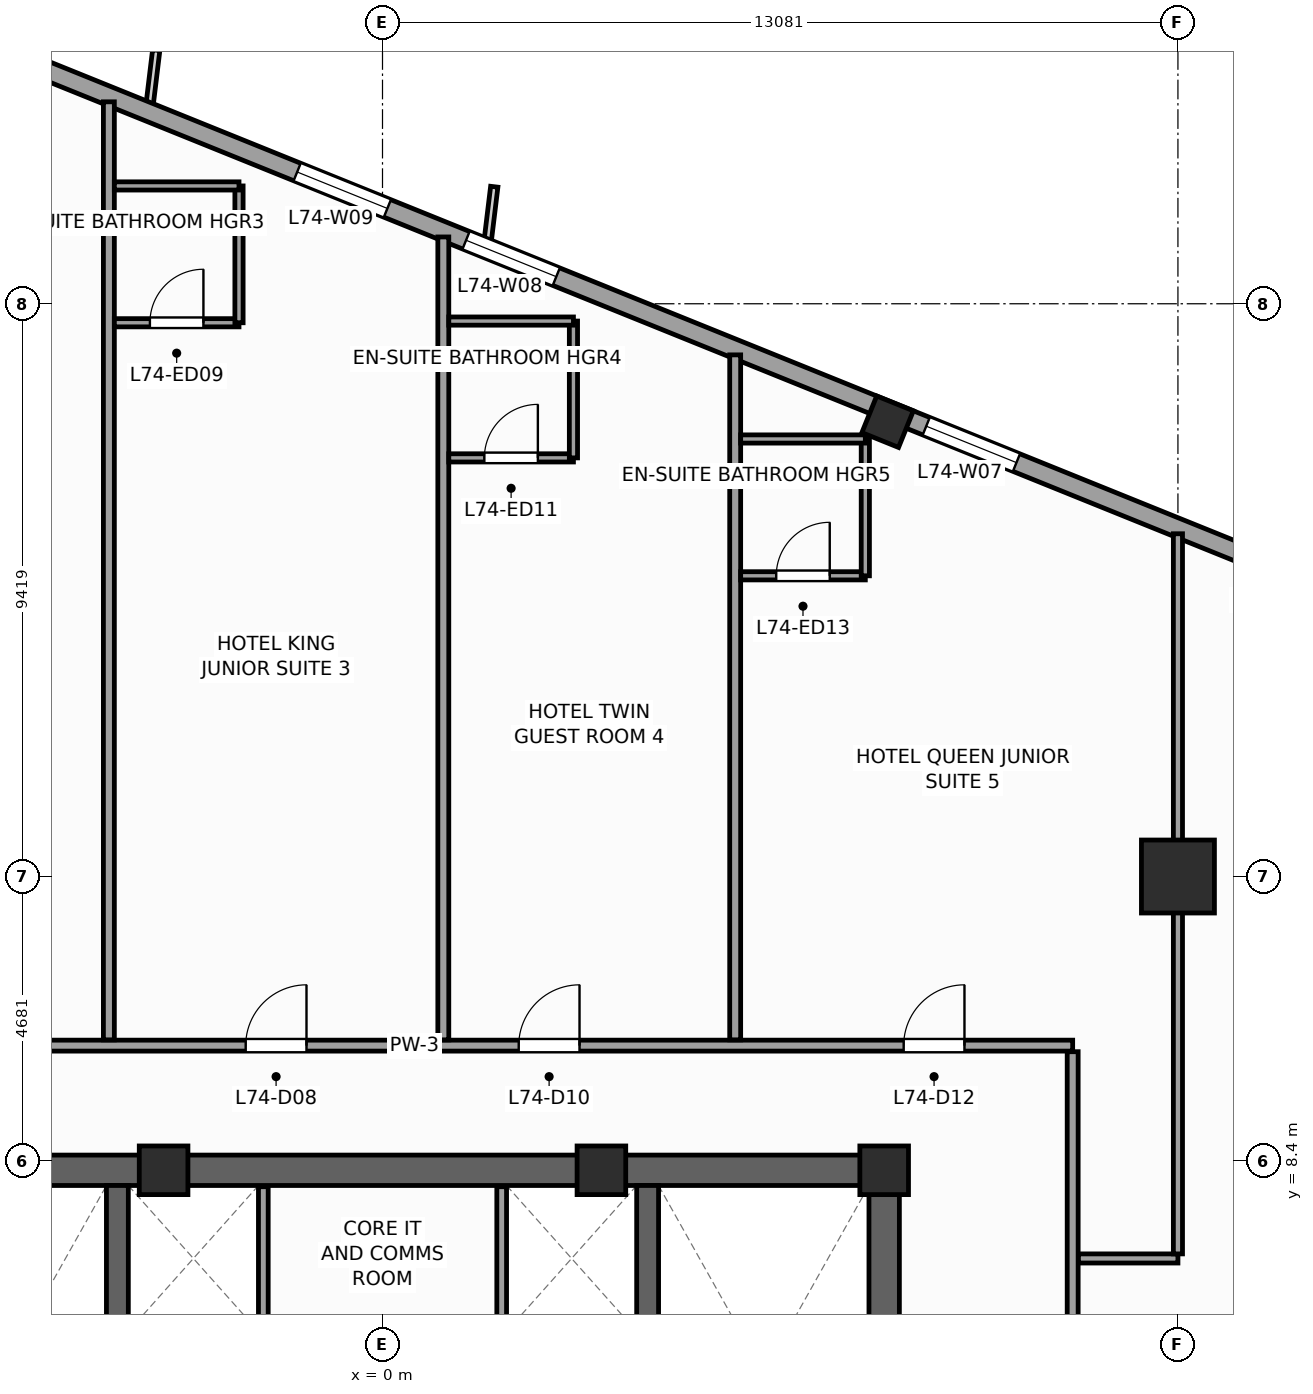
"""IFC4 building model, lengths in metres.
Left out: names, types, materials, properties, quantities, classifications, styles, units other than length and angle.
Written with IfcOpenShell. Run it as: python <this file> out.ifc"""

import sys

from ifc_helpers import new_model, si_unit, direction, frame, frame_2d, origin, origin_2d, place, context, subcontext, project, spatial, rectangle, extrude, source, transform, mapped, element, fill, save


model = new_model("IFC4")
c1 = context("Model", 3, precision=1e-05, world=origin(), true_north=direction((0.0, 1.0)))
c2 = subcontext(c1, "Body", "Model", "MODEL_VIEW")
j1 = project(units=[si_unit("LENGTHUNIT", "METRE"), si_unit("PLANEANGLEUNIT", "RADIAN")], contexts=[c1])
p1 = place(None, origin())
s1 = spatial("IfcSite", under=j1, at=p1, CompositionType="ELEMENT")
p2 = place(p1, origin())
s2 = spatial("IfcBuilding", under=s1, at=p2, CompositionType="ELEMENT")
p3 = place(p2, frame((0.0, 0.0, 301.2)))
s3 = spatial("IfcBuildingStorey", under=s2, at=p3, CompositionType="ELEMENT", Elevation=301.2)
p4 = place(p3, frame((-8.5, 8.25, 0.0), z_axis=(0.0, 0.0, 1.0), x_axis=(1.0, 0.0, 0.0)))
e1 = element("IfcWall", 1, at=p4, inside=s3, PredefinedType="SHEAR", context=c2, shape_type="SweptSolid", body=[
    extrude(rectangle(XDim=17.0, YDim=0.5, at=frame_2d((8.5, 0.0))), origin(), (0.0, 0.0, 1.0), 3.6),
])
p5 = place(p3, frame((8.25, -8.0, 0.0), z_axis=(0.0, 0.0, 1.0), x_axis=(0.0, 1.0, 0.0)))
e2 = element("IfcWall", 2, at=p5, inside=s3, PredefinedType="SHEAR", context=c2, shape_type="SweptSolid", body=[
    extrude(rectangle(XDim=16.0, YDim=0.5, at=frame_2d((8.0, 0.0))), origin(), (0.0, 0.0, 1.0), 3.6),
])
p6 = place(p5, frame((4.69, 0.0, 0.0)))
e3 = element("IfcOpeningElement", 3, at=p6, cuts=e2, PredefinedType="OPENING", context=c2, shape_type="SweptSolid", body=[
    extrude(rectangle(XDim=1.3, YDim=2.2, at=frame_2d((0.65, 1.1))), frame((0.0, 0.26, 0.0), z_axis=(0.0, -1.0, 0.0), x_axis=(1.0, 0.0, 0.0)), (0.0, 0.0, 1.0), 0.52),
])
for number, where, z_axis, x_axis in (
    (4, (-4.36, -8.0, 0.0), (0.0, 0.0, 1.0), (0.0, 1.0, 0.0)),
    (5, (4.36, -8.0, 0.0), (0.0, 0.0, 1.0), (0.0, 1.0, 0.0)),
):
    element("IfcWall", number, at=place(p3, frame(where, z_axis=z_axis, x_axis=x_axis)), inside=s3, PredefinedType="SHEAR", context=c2, shape_type="SweptSolid", body=[
        extrude(rectangle(XDim=16.0, YDim=0.36, at=frame_2d((8.0, 0.0))), origin(), (0.0, 0.0, 1.0), 3.6),
    ])
m1 = source(origin(), c2, "Body", "SweptSolid", [
    extrude(rectangle(XDim=0.8, YDim=0.8, at=origin_2d()), origin(), (0.0, 0.0, 1.0), 3.6),
])
for number, where, z_axis, x_axis in (
    (6, (8.25, 8.25, 0.0), (0.0, 0.0, 1.0), (1.0, 0.0, 0.0)),
    (7, (-3.6, 8.25, 0.0), (0.0, 0.0, 1.0), (1.0, 0.0, 0.0)),
    (8, (3.6, 8.25, 0.0), (0.0, 0.0, 1.0), (1.0, 0.0, 0.0)),
):
    element("IfcColumn", number, at=place(p3, frame(where, z_axis=z_axis, x_axis=x_axis)), inside=s3, PredefinedType="PILASTER", context=c2, shape_type="MappedRepresentation", body=[
        mapped(m1, transform((0.0, 0.0, 0.0), scale=1.0)),
    ])
m2 = source(origin(), c2, "Body", "SweptSolid", [
    extrude(rectangle(XDim=1.2, YDim=1.2, at=origin_2d()), origin(), (0.0, 0.0, 1.0), 3.6),
])
p7 = place(p3, frame((13.081, 13.081, 0.0), z_axis=(0.0, 0.0, 1.0), x_axis=(1.0, 0.0, 0.0)))
e9 = element("IfcColumn", 9, at=p7, inside=s3, PredefinedType="COLUMN", context=c2, shape_type="MappedRepresentation", body=[
    mapped(m2, transform((0.0, 0.0, 0.0), scale=1.0)),
])
m3 = source(origin(), c2, "Body", "SweptSolid", [
    extrude(rectangle(XDim=0.65, YDim=0.65, at=origin_2d()), origin(), (0.0, 0.0, 1.0), 3.6),
])
p8 = place(p3, frame((8.307, 20.56, 0.0), z_axis=(0.0, 0.0, 1.0), x_axis=(0.374606593416, 0.927183854567, 0.0)))
e10 = element("IfcColumn", 10, at=p8, inside=s3, PredefinedType="COLUMN", context=c2, shape_type="MappedRepresentation", body=[
    mapped(m3, transform((0.0, 0.0, 0.0), scale=1.0)),
])
p9 = place(p3, frame((23.813, 14.479, 0.0), z_axis=(0.0, 0.0, 1.0), x_axis=(-0.927182657188, 0.374609557019, 0.0)))
e11 = element("IfcWall", 11, at=p9, inside=s3, PredefinedType="STANDARD", context=c2, shape_type="SweptSolid", body=[
    extrude(rectangle(XDim=33.31, YDim=0.31, at=frame_2d((16.655, 0.0))), origin(), (0.0, 0.0, 1.0), 2.75),
])
p10 = place(p9, frame((3.197, 0.0, 0.47)))
e12 = element("IfcOpeningElement", 12, at=p10, cuts=e11, PredefinedType="OPENING", context=c2, shape_type="SweptSolid", body=[
    extrude(rectangle(XDim=1.6, YDim=2.1, at=frame_2d((0.8, 1.05))), frame((0.0, 0.165, 0.0), z_axis=(0.0, -1.0, 0.0), x_axis=(1.0, 0.0, 0.0)), (0.0, 0.0, 1.0), 0.33),
])
p11 = place(p9, frame((8.86, 0.0, 0.47)))
e13 = element("IfcOpeningElement", 13, at=p11, cuts=e11, PredefinedType="OPENING", context=c2, shape_type="SweptSolid", body=[
    extrude(rectangle(XDim=1.6, YDim=2.1, at=frame_2d((0.8, 1.05))), frame((0.0, 0.165, 0.0), z_axis=(0.0, -1.0, 0.0), x_axis=(1.0, 0.0, 0.0)), (0.0, 0.0, 1.0), 0.33),
])
p12 = place(p9, frame((14.439, 0.0, 0.47)))
e14 = element("IfcOpeningElement", 14, at=p12, cuts=e11, PredefinedType="OPENING", context=c2, shape_type="SweptSolid", body=[
    extrude(rectangle(XDim=1.6, YDim=2.1, at=frame_2d((0.8, 1.05))), frame((0.0, 0.165, 0.0), z_axis=(0.0, -1.0, 0.0), x_axis=(1.0, 0.0, 0.0)), (0.0, 0.0, 1.0), 0.33),
])
p13 = place(p9, frame((22.601, 0.0, 0.47)))
e15 = element("IfcOpeningElement", 15, at=p13, cuts=e11, PredefinedType="OPENING", context=c2, shape_type="SweptSolid", body=[
    extrude(rectangle(XDim=1.6, YDim=2.1, at=frame_2d((0.8, 1.05))), frame((0.0, 0.165, 0.0), z_axis=(0.0, -1.0, 0.0), x_axis=(1.0, 0.0, 0.0)), (0.0, 0.0, 1.0), 0.33),
])
p14 = place(p9, frame((25.597, 0.0, 0.47)))
e16 = element("IfcOpeningElement", 16, at=p14, cuts=e11, PredefinedType="OPENING", context=c2, shape_type="SweptSolid", body=[
    extrude(rectangle(XDim=1.6, YDim=2.1, at=frame_2d((0.8, 1.05))), frame((0.0, 0.165, 0.0), z_axis=(0.0, -1.0, 0.0), x_axis=(1.0, 0.0, 0.0)), (0.0, 0.0, 1.0), 0.33),
])
for number, where, z_axis, x_axis in (
    (17, (-1.96, 4.58, 0.0), (0.0, 0.0, 1.0), (0.0, 1.0, 0.0)),
    (18, (1.96, 4.58, 0.0), (0.0, 0.0, 1.0), (0.0, 1.0, 0.0)),
):
    element("IfcWall", number, at=place(p3, frame(where, z_axis=z_axis, x_axis=x_axis)), inside=s3, PredefinedType="PARTITIONING", context=c2, shape_type="SweptSolid", body=[
        extrude(rectangle(XDim=3.4, YDim=0.16, at=frame_2d((1.7, 0.0))), origin(), (0.0, 0.0, 1.0), 3.35),
    ])
p15 = place(p3, frame((-10.3, 10.3, 0.0), z_axis=(0.0, 0.0, 1.0), x_axis=(1.0, 0.0, 0.0)))
e19 = element("IfcWall", 19, at=p15, inside=s3, PredefinedType="PARTITIONING", context=c2, shape_type="SweptSolid", body=[
    extrude(rectangle(XDim=21.65, YDim=0.18, at=frame_2d((10.825, 0.0))), origin(), (0.0, 0.0, 1.0), 3.35),
])
p16 = place(p15, frame((2.564, 0.0, 0.0)))
e20 = element("IfcOpeningElement", 20, at=p16, cuts=e19, PredefinedType="OPENING", context=c2, shape_type="SweptSolid", body=[
    extrude(rectangle(XDim=1.0, YDim=2.15, at=frame_2d((0.5, 1.075))), frame((0.0, 0.1, 0.0), z_axis=(0.0, -1.0, 0.0), x_axis=(1.0, 0.0, 0.0)), (0.0, 0.0, 1.0), 0.2),
])
p17 = place(p15, frame((8.05, 0.0, 0.0)))
e21 = element("IfcOpeningElement", 21, at=p17, cuts=e19, PredefinedType="OPENING", context=c2, shape_type="SweptSolid", body=[
    extrude(rectangle(XDim=1.0, YDim=2.15, at=frame_2d((0.5, 1.075))), frame((0.0, 0.1, 0.0), z_axis=(0.0, -1.0, 0.0), x_axis=(1.0, 0.0, 0.0)), (0.0, 0.0, 1.0), 0.2),
])
p18 = place(p15, frame((12.54, 0.0, 0.0)))
e22 = element("IfcOpeningElement", 22, at=p18, cuts=e19, PredefinedType="OPENING", context=c2, shape_type="SweptSolid", body=[
    extrude(rectangle(XDim=1.0, YDim=2.15, at=frame_2d((0.5, 1.075))), frame((0.0, 0.1, 0.0), z_axis=(0.0, -1.0, 0.0), x_axis=(1.0, 0.0, 0.0)), (0.0, 0.0, 1.0), 0.2),
])
p19 = place(p15, frame((18.871, 0.0, 0.0)))
e23 = element("IfcOpeningElement", 23, at=p19, cuts=e19, PredefinedType="OPENING", context=c2, shape_type="SweptSolid", body=[
    extrude(rectangle(XDim=1.0, YDim=2.15, at=frame_2d((0.5, 1.075))), frame((0.0, 0.1, 0.0), z_axis=(0.0, -1.0, 0.0), x_axis=(1.0, 0.0, 0.0)), (0.0, 0.0, 1.0), 0.2),
])
p20 = place(p3, frame((11.35, -12.35, 0.0), z_axis=(0.0, 0.0, 1.0), x_axis=(0.0, 1.0, 0.0)))
e24 = element("IfcWall", 24, at=p20, inside=s3, PredefinedType="PARTITIONING", context=c2, shape_type="SweptSolid", body=[
    extrude(rectangle(XDim=22.55, YDim=0.18, at=frame_2d((11.275, 0.0))), origin(), (0.0, 0.0, 1.0), 3.35),
])
p21 = place(p20, frame((17.15, 0.0, 0.0)))
e25 = element("IfcOpeningElement", 25, at=p21, cuts=e24, PredefinedType="OPENING", context=c2, shape_type="SweptSolid", body=[
    extrude(rectangle(XDim=1.0, YDim=2.15, at=frame_2d((0.5, 1.075))), frame((0.0, 0.1, 0.0), z_axis=(0.0, -1.0, 0.0), x_axis=(1.0, 0.0, 0.0)), (0.0, 0.0, 1.0), 0.2),
])
p22 = place(p20, frame((13.5, 0.0, 0.0)))
e26 = element("IfcOpeningElement", 26, at=p22, cuts=e24, PredefinedType="OPENING", context=c2, shape_type="SweptSolid", body=[
    extrude(rectangle(XDim=1.0, YDim=2.15, at=frame_2d((0.5, 1.075))), frame((0.0, 0.1, 0.0), z_axis=(0.0, -1.0, 0.0), x_axis=(1.0, 0.0, 0.0)), (0.0, 0.0, 1.0), 0.2),
])
p23 = place(p20, frame((9.5, 0.0, 0.0)))
e27 = element("IfcOpeningElement", 27, at=p23, cuts=e24, PredefinedType="OPENING", context=c2, shape_type="SweptSolid", body=[
    extrude(rectangle(XDim=1.0, YDim=2.15, at=frame_2d((0.5, 1.075))), frame((0.0, 0.1, 0.0), z_axis=(0.0, -1.0, 0.0), x_axis=(1.0, 0.0, 0.0)), (0.0, 0.0, 1.0), 0.2),
])
p24 = place(p20, frame((6.35, 0.0, 0.0)))
e28 = element("IfcOpeningElement", 28, at=p24, cuts=e24, PredefinedType="OPENING", context=c2, shape_type="SweptSolid", body=[
    extrude(rectangle(XDim=1.0, YDim=2.15, at=frame_2d((0.5, 1.075))), frame((0.0, 0.1, 0.0), z_axis=(0.0, -1.0, 0.0), x_axis=(1.0, 0.0, 0.0)), (0.0, 0.0, 1.0), 0.2),
])
p25 = place(p20, frame((2.439, 0.0, 0.0)))
e29 = element("IfcOpeningElement", 29, at=p25, cuts=e24, PredefinedType="OPENING", context=c2, shape_type="SweptSolid", body=[
    extrude(rectangle(XDim=1.0, YDim=2.15, at=frame_2d((0.5, 1.075))), frame((0.0, 0.1, 0.0), z_axis=(0.0, -1.0, 0.0), x_axis=(1.0, 0.0, 0.0)), (0.0, 0.0, 1.0), 0.2),
])
p26 = place(p3, frame((-4.5, 10.395, 0.0), z_axis=(0.0, 0.0, 1.0), x_axis=(0.0, 1.0, 0.0)))
e30 = element("IfcWall", 30, at=p26, inside=s3, PredefinedType="PARTITIONING", context=c2, shape_type="SweptSolid", body=[
    extrude(rectangle(XDim=15.426, YDim=0.18, at=frame_2d((7.713, 0.0))), origin(), (0.0, 0.0, 1.0), 3.35),
])
p27 = place(p3, frame((1.0, 10.395, 0.0), z_axis=(0.0, 0.0, 1.0), x_axis=(0.0, 1.0, 0.0)))
e31 = element("IfcWall", 31, at=p27, inside=s3, PredefinedType="PARTITIONING", context=c2, shape_type="SweptSolid", body=[
    extrude(rectangle(XDim=13.204, YDim=0.18, at=frame_2d((6.602, 0.0))), origin(), (0.0, 0.0, 1.0), 3.35),
])
p28 = place(p3, frame((5.8, 10.395, 0.0), z_axis=(0.0, 0.0, 1.0), x_axis=(0.0, 1.0, 0.0)))
e32 = element("IfcWall", 32, at=p28, inside=s3, PredefinedType="PARTITIONING", context=c2, shape_type="SweptSolid", body=[
    extrude(rectangle(XDim=11.264, YDim=0.18, at=frame_2d((5.632, 0.0))), origin(), (0.0, 0.0, 1.0), 3.35),
])
p29 = place(p3, frame((11.445, 6.8, 0.0), z_axis=(0.0, 0.0, 1.0), x_axis=(1.0, 0.0, 0.0)))
e33 = element("IfcWall", 33, at=p29, inside=s3, PredefinedType="PARTITIONING", context=c2, shape_type="SweptSolid", body=[
    extrude(rectangle(XDim=1.636, YDim=0.15, at=frame_2d((0.818, 0.0))), origin(), (0.0, 0.0, 1.0), 3.35),
])
p30 = place(p3, frame((13.081, 6.875, 0.0), z_axis=(0.0, 0.0, 1.0), x_axis=(0.0, 1.0, 0.0)))
e34 = element("IfcWall", 34, at=p30, inside=s3, PredefinedType="PARTITIONING", context=c2, shape_type="SweptSolid", body=[
    extrude(rectangle(XDim=11.843, YDim=0.15, at=frame_2d((5.921, 0.0))), origin(), (0.0, 0.0, 1.0), 2.45),
])
p31 = place(p3, frame((-4.41, 22.188, 0.0), z_axis=(0.0, 0.0, 1.0), x_axis=(1.0, 0.0, 0.0)))
e35 = element("IfcWall", 35, at=p31, inside=s3, PredefinedType="PARTITIONING", context=c2, shape_type="SweptSolid", body=[
    extrude(rectangle(XDim=2.05, YDim=0.135, at=frame_2d((1.025, 0.0))), origin(), (0.0, 0.0, 1.0), 3.35),
])
p32 = place(p31, frame((0.585, 0.0, 0.0)))
e36 = element("IfcOpeningElement", 36, at=p32, cuts=e35, PredefinedType="OPENING", context=c2, shape_type="SweptSolid", body=[
    extrude(rectangle(XDim=0.88, YDim=2.1, at=frame_2d((0.44, 1.05))), frame((0.0, 0.078, 0.0), z_axis=(0.0, -1.0, 0.0), x_axis=(1.0, 0.0, 0.0)), (0.0, 0.0, 1.0), 0.155),
])
p33 = place(p3, frame((-2.36, 22.188, 0.0), z_axis=(0.0, 0.0, 1.0), x_axis=(0.0, 1.0, 0.0)))
e37 = element("IfcWall", 37, at=p33, inside=s3, PredefinedType="PARTITIONING", context=c2, shape_type="SweptSolid", body=[
    extrude(rectangle(XDim=2.25, YDim=0.135, at=frame_2d((1.125, 0.0))), origin(), (0.0, 0.0, 1.0), 3.35),
])
p34 = place(p3, frame((-4.41, 24.438, 0.0), z_axis=(0.0, 0.0, 1.0), x_axis=(1.0, 0.0, 0.0)))
e38 = element("IfcWall", 38, at=p34, inside=s3, PredefinedType="PARTITIONING", context=c2, shape_type="SweptSolid", body=[
    extrude(rectangle(XDim=2.05, YDim=0.135, at=frame_2d((1.025, 0.0))), origin(), (0.0, 0.0, 1.0), 3.35),
])
p35 = place(p3, frame((1.09, 19.965, 0.0), z_axis=(0.0, 0.0, 1.0), x_axis=(1.0, 0.0, 0.0)))
e39 = element("IfcWall", 39, at=p35, inside=s3, PredefinedType="PARTITIONING", context=c2, shape_type="SweptSolid", body=[
    extrude(rectangle(XDim=2.05, YDim=0.135, at=frame_2d((1.025, 0.0))), origin(), (0.0, 0.0, 1.0), 3.35),
])
p36 = place(p35, frame((0.585, 0.0, 0.0)))
e40 = element("IfcOpeningElement", 40, at=p36, cuts=e39, PredefinedType="OPENING", context=c2, shape_type="SweptSolid", body=[
    extrude(rectangle(XDim=0.88, YDim=2.1, at=frame_2d((0.44, 1.05))), frame((0.0, 0.078, 0.0), z_axis=(0.0, -1.0, 0.0), x_axis=(1.0, 0.0, 0.0)), (0.0, 0.0, 1.0), 0.155),
])
p37 = place(p3, frame((3.14, 19.965, 0.0), z_axis=(0.0, 0.0, 1.0), x_axis=(0.0, 1.0, 0.0)))
e41 = element("IfcWall", 41, at=p37, inside=s3, PredefinedType="PARTITIONING", context=c2, shape_type="SweptSolid", body=[
    extrude(rectangle(XDim=2.25, YDim=0.135, at=frame_2d((1.125, 0.0))), origin(), (0.0, 0.0, 1.0), 3.35),
])
p38 = place(p3, frame((1.09, 22.215, 0.0), z_axis=(0.0, 0.0, 1.0), x_axis=(1.0, 0.0, 0.0)))
e42 = element("IfcWall", 42, at=p38, inside=s3, PredefinedType="PARTITIONING", context=c2, shape_type="SweptSolid", body=[
    extrude(rectangle(XDim=2.05, YDim=0.135, at=frame_2d((1.025, 0.0))), origin(), (0.0, 0.0, 1.0), 3.35),
])
p39 = place(p3, frame((5.89, 18.026, 0.0), z_axis=(0.0, 0.0, 1.0), x_axis=(1.0, 0.0, 0.0)))
e43 = element("IfcWall", 43, at=p39, inside=s3, PredefinedType="PARTITIONING", context=c2, shape_type="SweptSolid", body=[
    extrude(rectangle(XDim=2.05, YDim=0.135, at=frame_2d((1.025, 0.0))), origin(), (0.0, 0.0, 1.0), 2.95),
])
p40 = place(p39, frame((0.585, 0.0, 0.0)))
e44 = element("IfcOpeningElement", 44, at=p40, cuts=e43, PredefinedType="OPENING", context=c2, shape_type="SweptSolid", body=[
    extrude(rectangle(XDim=0.88, YDim=2.1, at=frame_2d((0.44, 1.05))), frame((0.0, 0.078, 0.0), z_axis=(0.0, -1.0, 0.0), x_axis=(1.0, 0.0, 0.0)), (0.0, 0.0, 1.0), 0.155),
])
p41 = place(p3, frame((7.94, 18.026, 0.0), z_axis=(0.0, 0.0, 1.0), x_axis=(0.0, 1.0, 0.0)))
e45 = element("IfcWall", 45, at=p41, inside=s3, PredefinedType="PARTITIONING", context=c2, shape_type="SweptSolid", body=[
    extrude(rectangle(XDim=2.25, YDim=0.135, at=frame_2d((1.125, 0.0))), origin(), (0.0, 0.0, 1.0), 3.35),
])
p42 = place(p3, frame((5.89, 20.276, 0.0), z_axis=(0.0, 0.0, 1.0), x_axis=(1.0, 0.0, 0.0)))
e46 = element("IfcWall", 46, at=p42, inside=s3, PredefinedType="PARTITIONING", context=c2, shape_type="SweptSolid", body=[
    extrude(rectangle(XDim=2.05, YDim=0.135, at=frame_2d((1.025, 0.0))), origin(), (0.0, 0.0, 1.0), 3.35),
])
m4 = source(origin(), c2, "Body", "SweptSolid", [
    extrude(rectangle(XDim=1.6, YDim=2.1, at=frame_2d((0.8, 1.05))), frame((0.0, 0.03, 0.0), z_axis=(0.0, -1.0, 0.0), x_axis=(1.0, 0.0, 0.0)), (0.0, 0.0, 1.0), 0.06),
])
p43 = place(p12, origin())
e47 = element("IfcWindow", 47, at=p43, inside=s3, PartitioningType="SINGLE_PANEL", PredefinedType="WINDOW", context=c2, shape_type="MappedRepresentation", body=[
    mapped(m4, transform((0.0, 0.0, 0.0), scale=1.0)),
])
fill(e14, e47)
p44 = place(p13, origin())
e48 = element("IfcWindow", 48, at=p44, inside=s3, PartitioningType="SINGLE_PANEL", PredefinedType="WINDOW", context=c2, shape_type="MappedRepresentation", body=[
    mapped(m4, transform((0.0, 0.0, 0.0), scale=1.0)),
])
fill(e15, e48)
p45 = place(p14, origin())
e49 = element("IfcWindow", 49, at=p45, inside=s3, PartitioningType="SINGLE_PANEL", PredefinedType="WINDOW", context=c2, shape_type="MappedRepresentation", body=[
    mapped(m4, transform((0.0, 0.0, 0.0), scale=1.0)),
])
fill(e16, e49)
m5 = source(origin(), c2, "Body", "SweptSolid", [
    extrude(rectangle(XDim=1.0, YDim=2.15, at=frame_2d((0.5, 1.075))), frame((0.0, 0.025, 0.0), z_axis=(0.0, -1.0, 0.0), x_axis=(1.0, 0.0, 0.0)), (0.0, 0.0, 1.0), 0.05),
])
p46 = place(p17, origin())
e50 = element("IfcDoor", 50, at=p46, inside=s3, OperationType="SINGLE_SWING_RIGHT", PredefinedType="DOOR", context=c2, shape_type="MappedRepresentation", body=[
    mapped(m5, transform((0.0, 0.0, 0.0), scale=1.0)),
])
fill(e21, e50)
m6 = source(origin(), c2, "Body", "SweptSolid", [
    extrude(rectangle(XDim=0.88, YDim=2.1, at=frame_2d((0.44, 1.05))), frame((0.0, 0.025, 0.0), z_axis=(0.0, -1.0, 0.0), x_axis=(1.0, 0.0, 0.0)), (0.0, 0.0, 1.0), 0.05),
])
p47 = place(p32, origin())
e51 = element("IfcDoor", 51, at=p47, inside=s3, OperationType="SINGLE_SWING_RIGHT", PredefinedType="DOOR", context=c2, shape_type="MappedRepresentation", body=[
    mapped(m6, transform((0.0, 0.0, 0.0), scale=1.0)),
])
fill(e36, e51)
p48 = place(p18, origin())
e52 = element("IfcDoor", 52, at=p48, inside=s3, OperationType="SINGLE_SWING_RIGHT", PredefinedType="DOOR", context=c2, shape_type="MappedRepresentation", body=[
    mapped(m5, transform((0.0, 0.0, 0.0), scale=1.0)),
])
fill(e22, e52)
p49 = place(p36, origin())
e53 = element("IfcDoor", 53, at=p49, inside=s3, OperationType="SINGLE_SWING_RIGHT", PredefinedType="DOOR", context=c2, shape_type="MappedRepresentation", body=[
    mapped(m6, transform((0.0, 0.0, 0.0), scale=1.0)),
])
fill(e40, e53)
p50 = place(p19, origin())
e54 = element("IfcDoor", 54, at=p50, inside=s3, OperationType="SINGLE_SWING_RIGHT", PredefinedType="DOOR", context=c2, shape_type="MappedRepresentation", body=[
    mapped(m5, transform((0.0, 0.0, 0.0), scale=1.0)),
])
fill(e23, e54)
p51 = place(p40, origin())
e55 = element("IfcDoor", 55, at=p51, inside=s3, OperationType="SINGLE_SWING_RIGHT", PredefinedType="DOOR", context=c2, shape_type="MappedRepresentation", body=[
    mapped(m6, transform((0.0, 0.0, 0.0), scale=1.0)),
])
fill(e44, e55)
save(model, sys.argv[1])
